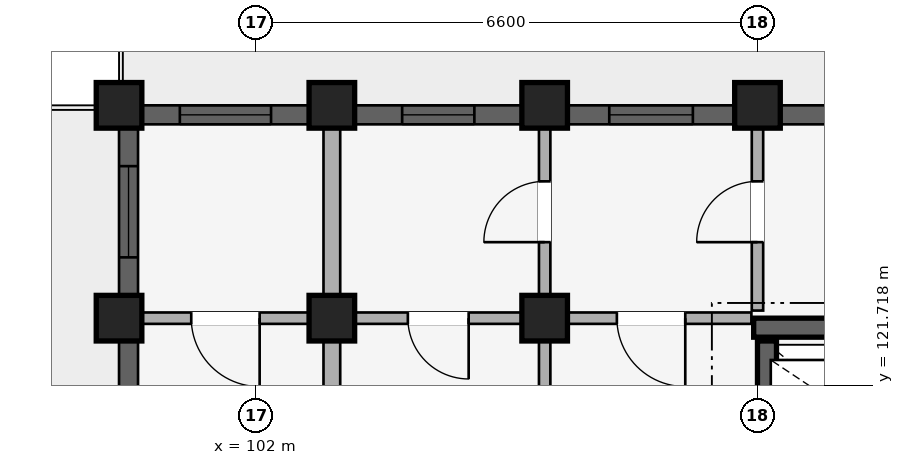
"""IFC4 building model, lengths in metres.
Left out: names, types, materials, properties, quantities, classifications, styles, units other than length and angle.
Written with IfcOpenShell. Run it as: python <this file> out.ifc"""

import sys

from ifc_helpers import new_model, si_unit, direction, frame, frame_2d, origin, origin_2d, place, context, subcontext, project, spatial, rectangle, extrude, element, fill, save


model = new_model("IFC4")
c1 = context("Model", 3, precision=1e-05, world=origin(), true_north=direction((0.0, 1.0)))
c2 = subcontext(c1, "Body", "Model", "MODEL_VIEW")
j1 = project(units=[si_unit("LENGTHUNIT", "METRE"), si_unit("PLANEANGLEUNIT", "RADIAN")], contexts=[c1])
p1 = place(None, origin())
s1 = spatial("IfcSite", under=j1, at=p1, CompositionType="ELEMENT")
p2 = place(p1, origin())
s2 = spatial("IfcBuilding", under=s1, at=p2, CompositionType="ELEMENT")
p3 = place(p2, frame((0.0, 0.0, 37.05)))
s3 = spatial("IfcBuildingStorey", under=s2, at=p3, CompositionType="ELEMENT", Elevation=37.05)
p4 = place(p3, frame((111.35, 122.475, 0.0), z_axis=(0.0, 0.0, 1.0), x_axis=(-1.0, 0.0, 0.0)))
e1 = element("IfcWall", 1, at=p4, inside=s3, PredefinedType="SHEAR", context=c2, shape_type="SweptSolid", body=[
    extrude(rectangle(XDim=2.8, YDim=0.25, at=frame_2d((1.4, 0.0))), origin(), (0.0, 0.0, 1.0), 2.93),
])
p5 = place(p3, frame((108.725, 120.15, 0.0), z_axis=(0.0, 0.0, 1.0), x_axis=(0.0, 1.0, 0.0)))
e2 = element("IfcWall", 2, at=p5, inside=s3, PredefinedType="SHEAR", context=c2, shape_type="SweptSolid", body=[
    extrude(rectangle(XDim=2.15, YDim=0.25, at=frame_2d((1.075, 0.0))), origin(), (0.0, 0.0, 1.0), 2.93),
])
p6 = place(p3, frame((108.6, 125.4, 0.0), z_axis=(0.0, 0.0, 1.0), x_axis=(1.0, 0.0, 0.0)))
e3 = element("IfcColumn", 3, at=p6, inside=s3, PredefinedType="COLUMN", context=c2, shape_type="SweptSolid", body=[
    extrude(rectangle(XDim=0.6, YDim=0.6, at=origin_2d()), origin(), (0.0, 0.0, 1.0), 2.97),
])
p7 = place(p3, frame((105.8, 122.6, 0.0), z_axis=(0.0, 0.0, 1.0), x_axis=(1.0, 0.0, 0.0)))
e4 = element("IfcColumn", 4, at=p7, inside=s3, PredefinedType="COLUMN", context=c2, shape_type="SweptSolid", body=[
    extrude(rectangle(XDim=0.6, YDim=0.6, at=origin_2d()), origin(), (0.0, 0.0, 1.0), 2.93),
])
p8 = place(p3, frame((105.8, 125.4, 0.0), z_axis=(0.0, 0.0, 1.0), x_axis=(1.0, 0.0, 0.0)))
e5 = element("IfcColumn", 5, at=p8, inside=s3, PredefinedType="COLUMN", context=c2, shape_type="SweptSolid", body=[
    extrude(rectangle(XDim=0.6, YDim=0.6, at=origin_2d()), origin(), (0.0, 0.0, 1.0), 2.97),
])
p9 = place(p3, frame((103.0, 122.6, 0.0), z_axis=(0.0, 0.0, 1.0), x_axis=(1.0, 0.0, 0.0)))
e6 = element("IfcColumn", 6, at=p9, inside=s3, PredefinedType="COLUMN", context=c2, shape_type="SweptSolid", body=[
    extrude(rectangle(XDim=0.6, YDim=0.6, at=origin_2d()), origin(), (0.0, 0.0, 1.0), 2.93),
])
p10 = place(p3, frame((103.0, 125.4, 0.0), z_axis=(0.0, 0.0, 1.0), x_axis=(1.0, 0.0, 0.0)))
e7 = element("IfcColumn", 7, at=p10, inside=s3, PredefinedType="COLUMN", context=c2, shape_type="SweptSolid", body=[
    extrude(rectangle(XDim=0.6, YDim=0.6, at=origin_2d()), origin(), (0.0, 0.0, 1.0), 2.97),
])
p11 = place(p3, frame((100.2, 122.6, 0.0), z_axis=(0.0, 0.0, 1.0), x_axis=(1.0, 0.0, 0.0)))
e8 = element("IfcColumn", 8, at=p11, inside=s3, PredefinedType="COLUMN", context=c2, shape_type="SweptSolid", body=[
    extrude(rectangle(XDim=0.6, YDim=0.6, at=origin_2d()), origin(), (0.0, 0.0, 1.0), 2.93),
])
p12 = place(p3, frame((100.2, 125.4, 0.0), z_axis=(0.0, 0.0, 1.0), x_axis=(1.0, 0.0, 0.0)))
e9 = element("IfcColumn", 9, at=p12, inside=s3, PredefinedType="COLUMN", context=c2, shape_type="SweptSolid", body=[
    extrude(rectangle(XDim=0.6, YDim=0.6, at=origin_2d()), origin(), (0.0, 0.0, 1.0), 2.97),
])
p13 = place(p3, frame((108.52, 122.6, 0.0), z_axis=(0.0, 0.0, 1.0), x_axis=(-1.0, 0.0, 0.0)))
e10 = element("IfcWall", 10, at=p13, inside=s3, PredefinedType="PLUMBINGWALL", context=c2, shape_type="SweptSolid", body=[
    extrude(rectangle(XDim=2.64, YDim=0.15, at=frame_2d((1.32, 0.0))), origin(), (0.0, 0.0, 1.0), 2.372),
])
p14 = place(p13, frame((0.87, 0.0, 0.0)))
e11 = element("IfcOpeningElement", 11, at=p14, cuts=e10, PredefinedType="OPENING", context=c2, shape_type="SweptSolid", body=[
    extrude(rectangle(XDim=0.9, YDim=2.1, at=frame_2d((0.45, 1.05))), frame((0.0, 0.085, 0.0), z_axis=(0.0, -1.0, 0.0), x_axis=(1.0, 0.0, 0.0)), (0.0, 0.0, 1.0), 0.17),
])
p15 = place(p3, frame((105.72, 122.6, 0.0), z_axis=(0.0, 0.0, 1.0), x_axis=(-1.0, 0.0, 0.0)))
e12 = element("IfcWall", 12, at=p15, inside=s3, PredefinedType="PLUMBINGWALL", context=c2, shape_type="SweptSolid", body=[
    extrude(rectangle(XDim=2.64, YDim=0.15, at=frame_2d((1.32, 0.0))), origin(), (0.0, 0.0, 1.0), 2.372),
])
p16 = place(p15, frame((0.92, 0.0, 0.0)))
e13 = element("IfcOpeningElement", 13, at=p16, cuts=e12, PredefinedType="OPENING", context=c2, shape_type="SweptSolid", body=[
    extrude(rectangle(XDim=0.8, YDim=2.1, at=frame_2d((0.4, 1.05))), frame((0.0, 0.085, 0.0), z_axis=(0.0, -1.0, 0.0), x_axis=(1.0, 0.0, 0.0)), (0.0, 0.0, 1.0), 0.17),
])
p17 = place(p3, frame((102.92, 122.6, 0.0), z_axis=(0.0, 0.0, 1.0), x_axis=(-1.0, 0.0, 0.0)))
e14 = element("IfcWall", 14, at=p17, inside=s3, PredefinedType="PLUMBINGWALL", context=c2, shape_type="SweptSolid", body=[
    extrude(rectangle(XDim=2.64, YDim=0.15, at=frame_2d((1.32, 0.0))), origin(), (0.0, 0.0, 1.0), 2.372),
])
p18 = place(p17, frame((0.87, 0.0, 0.0)))
e15 = element("IfcOpeningElement", 15, at=p18, cuts=e14, PredefinedType="OPENING", context=c2, shape_type="SweptSolid", body=[
    extrude(rectangle(XDim=0.9, YDim=2.1, at=frame_2d((0.45, 1.05))), frame((0.0, 0.085, 0.0), z_axis=(0.0, -1.0, 0.0), x_axis=(1.0, 0.0, 0.0)), (0.0, 0.0, 1.0), 0.17),
])
p19 = place(p3, frame((108.6, 122.7, 0.0), z_axis=(0.0, 0.0, 1.0), x_axis=(0.0, 1.0, 0.0)))
e16 = element("IfcWall", 16, at=p19, inside=s3, PredefinedType="PARTITIONING", context=c2, shape_type="SweptSolid", body=[
    extrude(rectangle(XDim=2.42, YDim=0.15, at=frame_2d((1.21, 0.0))), origin(), (0.0, 0.0, 1.0), 2.372),
])
p20 = place(p19, frame((0.9, 0.0, 0.0)))
e17 = element("IfcOpeningElement", 17, at=p20, cuts=e16, PredefinedType="OPENING", context=c2, shape_type="SweptSolid", body=[
    extrude(rectangle(XDim=0.8, YDim=2.1, at=frame_2d((0.4, 1.05))), frame((0.0, 0.085, 0.0), z_axis=(0.0, -1.0, 0.0), x_axis=(1.0, 0.0, 0.0)), (0.0, 0.0, 1.0), 0.17),
])
p21 = place(p3, frame((105.8, 116.05, 0.0), z_axis=(0.0, 0.0, 1.0), x_axis=(0.0, 1.0, 0.0)))
e18 = element("IfcWall", 18, at=p21, inside=s3, PredefinedType="PARTITIONING", context=c2, shape_type="SweptSolid", body=[
    extrude(rectangle(XDim=6.53, YDim=0.15, at=frame_2d((3.265, 0.0))), origin(), (0.0, 0.0, 1.0), 2.372),
])
p22 = place(p21, frame((2.815, 0.0, 0.0)))
e19 = element("IfcOpeningElement", 19, at=p22, cuts=e18, PredefinedType="OPENING", context=c2, shape_type="SweptSolid", body=[
    extrude(rectangle(XDim=0.9, YDim=2.1, at=frame_2d((0.45, 1.05))), frame((0.0, 0.085, 0.0), z_axis=(0.0, -1.0, 0.0), x_axis=(1.0, 0.0, 0.0)), (0.0, 0.0, 1.0), 0.17),
])
p23 = place(p3, frame((105.8, 122.7, 0.0), z_axis=(0.0, 0.0, 1.0), x_axis=(0.0, 1.0, 0.0)))
e20 = element("IfcWall", 20, at=p23, inside=s3, PredefinedType="PARTITIONING", context=c2, shape_type="SweptSolid", body=[
    extrude(rectangle(XDim=2.42, YDim=0.15, at=frame_2d((1.21, 0.0))), origin(), (0.0, 0.0, 1.0), 2.372),
])
p24 = place(p23, frame((0.9, 0.0, 0.0)))
e21 = element("IfcOpeningElement", 21, at=p24, cuts=e20, PredefinedType="OPENING", context=c2, shape_type="SweptSolid", body=[
    extrude(rectangle(XDim=0.8, YDim=2.1, at=frame_2d((0.4, 1.05))), frame((0.0, 0.085, 0.0), z_axis=(0.0, -1.0, 0.0), x_axis=(1.0, 0.0, 0.0)), (0.0, 0.0, 1.0), 0.17),
])
p25 = place(p3, frame((103.0, 116.05, 0.0), z_axis=(0.0, 0.0, 1.0), x_axis=(0.0, 1.0, 0.0)))
e22 = element("IfcWall", 22, at=p25, inside=s3, PredefinedType="STANDARD", context=c2, shape_type="SweptSolid", body=[
    extrude(rectangle(XDim=6.53, YDim=0.22, at=frame_2d((3.265, 0.0))), origin(), (0.0, 0.0, 1.0), 2.372),
])
p26 = place(p3, frame((103.0, 122.7, 0.0), z_axis=(0.0, 0.0, 1.0), x_axis=(0.0, 1.0, 0.0)))
e23 = element("IfcWall", 23, at=p26, inside=s3, PredefinedType="STANDARD", context=c2, shape_type="SweptSolid", body=[
    extrude(rectangle(XDim=2.42, YDim=0.22, at=frame_2d((1.21, 0.0))), origin(), (0.0, 0.0, 1.0), 2.372),
])
p27 = place(p3, frame((113.896, 125.275, 0.0), z_axis=(0.0, 0.0, 1.0), x_axis=(-1.0, 0.0, 0.0)))
e24 = element("IfcWall", 24, at=p27, inside=s3, PredefinedType="STANDARD", context=c2, shape_type="SweptSolid", body=[
    extrude(rectangle(XDim=4.993, YDim=0.25, at=frame_2d((2.497, 0.0))), origin(), (0.0, 0.0, 1.0), 2.48),
])
p28 = place(p27, frame((1.896, 0.0, 0.78)))
e25 = element("IfcOpeningElement", 25, at=p28, cuts=e24, PredefinedType="OPENING", context=c2, shape_type="SweptSolid", body=[
    extrude(rectangle(XDim=1.2, YDim=1.5, at=frame_2d((0.6, 0.75))), frame((0.0, 0.135, 0.0), z_axis=(0.0, -1.0, 0.0), x_axis=(1.0, 0.0, 0.0)), (0.0, 0.0, 1.0), 0.27),
])
p29 = place(p3, frame((108.296, 125.275, 0.0), z_axis=(0.0, 0.0, 1.0), x_axis=(-1.0, 0.0, 0.0)))
e26 = element("IfcWall", 26, at=p29, inside=s3, PredefinedType="STANDARD", context=c2, shape_type="SweptSolid", body=[
    extrude(rectangle(XDim=2.193, YDim=0.25, at=frame_2d((1.096, 0.0))), origin(), (0.0, 0.0, 1.0), 2.48),
])
p30 = place(p29, frame((0.546, 0.0, 0.83)))
e27 = element("IfcOpeningElement", 27, at=p30, cuts=e26, PredefinedType="OPENING", context=c2, shape_type="SweptSolid", body=[
    extrude(rectangle(XDim=1.1, YDim=1.45, at=frame_2d((0.55, 0.725))), frame((0.0, 0.135, 0.0), z_axis=(0.0, -1.0, 0.0), x_axis=(1.0, 0.0, 0.0)), (0.0, 0.0, 1.0), 0.27),
])
p31 = place(p3, frame((105.497, 125.275, 0.0), z_axis=(0.0, 0.0, 1.0), x_axis=(-1.0, 0.0, 0.0)))
e28 = element("IfcWall", 28, at=p31, inside=s3, PredefinedType="STANDARD", context=c2, shape_type="SweptSolid", body=[
    extrude(rectangle(XDim=2.193, YDim=0.25, at=frame_2d((1.097, 0.0))), origin(), (0.0, 0.0, 1.0), 2.48),
])
p32 = place(p31, frame((0.622, 0.0, 0.88)))
e29 = element("IfcOpeningElement", 29, at=p32, cuts=e28, PredefinedType="OPENING", context=c2, shape_type="SweptSolid", body=[
    extrude(rectangle(XDim=0.95, YDim=1.35, at=frame_2d((0.475, 0.675))), frame((0.0, 0.135, 0.0), z_axis=(0.0, -1.0, 0.0), x_axis=(1.0, 0.0, 0.0)), (0.0, 0.0, 1.0), 0.27),
])
p33 = place(p3, frame((102.697, 125.275, 0.0), z_axis=(0.0, 0.0, 1.0), x_axis=(-1.0, 0.0, 0.0)))
e30 = element("IfcWall", 30, at=p33, inside=s3, PredefinedType="STANDARD", context=c2, shape_type="SweptSolid", body=[
    extrude(rectangle(XDim=2.193, YDim=0.25, at=frame_2d((1.097, 0.0))), origin(), (0.0, 0.0, 1.0), 2.48),
])
p34 = place(p33, frame((0.497, 0.0, 0.78)))
e31 = element("IfcOpeningElement", 31, at=p34, cuts=e30, PredefinedType="OPENING", context=c2, shape_type="SweptSolid", body=[
    extrude(rectangle(XDim=1.2, YDim=1.5, at=frame_2d((0.6, 0.75))), frame((0.0, 0.135, 0.0), z_axis=(0.0, -1.0, 0.0), x_axis=(1.0, 0.0, 0.0)), (0.0, 0.0, 1.0), 0.27),
])
p35 = place(p3, frame((100.325, 116.329, 0.0), z_axis=(0.0, 0.0, 1.0), x_axis=(0.0, 1.0, 0.0)))
e32 = element("IfcWall", 32, at=p35, inside=s3, PredefinedType="STANDARD", context=c2, shape_type="SweptSolid", body=[
    extrude(rectangle(XDim=5.968, YDim=0.25, at=frame_2d((2.984, 0.0))), origin(), (0.0, 0.0, 1.0), 2.372),
])
p36 = place(p35, frame((3.754, 0.0, 0.522)))
e33 = element("IfcOpeningElement", 33, at=p36, cuts=e32, PredefinedType="OPENING", context=c2, shape_type="SweptSolid", body=[
    extrude(rectangle(XDim=1.2, YDim=1.5, at=frame_2d((0.6, 0.75))), frame((0.0, 0.135, 0.0), z_axis=(0.0, -1.0, 0.0), x_axis=(1.0, 0.0, 0.0)), (0.0, 0.0, 1.0), 0.27),
])
p37 = place(p35, frame((1.489, 0.0, 0.0)))
e34 = element("IfcOpeningElement", 34, at=p37, cuts=e32, PredefinedType="OPENING", context=c2, shape_type="SweptSolid", body=[
    extrude(rectangle(XDim=1.2, YDim=2.15, at=frame_2d((0.6, 1.075))), frame((0.0, 0.135, 0.0), z_axis=(0.0, -1.0, 0.0), x_axis=(1.0, 0.0, 0.0)), (0.0, 0.0, 1.0), 0.27),
])
p38 = place(p3, frame((100.325, 122.904, 0.0), z_axis=(0.0, 0.0, 1.0), x_axis=(0.0, 1.0, 0.0)))
e35 = element("IfcWall", 35, at=p38, inside=s3, PredefinedType="STANDARD", context=c2, shape_type="SweptSolid", body=[
    extrude(rectangle(XDim=2.193, YDim=0.25, at=frame_2d((1.096, 0.0))), origin(), (0.0, 0.0, 1.0), 2.412),
])
p39 = place(p38, frame((0.497, 0.0, 0.712)))
e36 = element("IfcOpeningElement", 36, at=p39, cuts=e35, PredefinedType="OPENING", context=c2, shape_type="SweptSolid", body=[
    extrude(rectangle(XDim=1.2, YDim=1.5, at=frame_2d((0.6, 0.75))), frame((0.0, 0.135, 0.0), z_axis=(0.0, -1.0, 0.0), x_axis=(1.0, 0.0, 0.0)), (0.0, 0.0, 1.0), 0.27),
])
p40 = place(p30, origin())
e37 = element("IfcWindow", 37, at=p40, inside=s3, PartitioningType="SINGLE_PANEL", PredefinedType="WINDOW", context=c2, shape_type="SweptSolid", body=[
    extrude(rectangle(XDim=1.1, YDim=1.45, at=frame_2d((0.55, 0.725))), frame((0.0, 0.03, 0.0), z_axis=(0.0, -1.0, 0.0), x_axis=(1.0, 0.0, 0.0)), (0.0, 0.0, 1.0), 0.06),
])
fill(e27, e37)
p41 = place(p32, origin())
e38 = element("IfcWindow", 38, at=p41, inside=s3, PartitioningType="SINGLE_PANEL", PredefinedType="WINDOW", context=c2, shape_type="SweptSolid", body=[
    extrude(rectangle(XDim=0.95, YDim=1.35, at=frame_2d((0.475, 0.675))), frame((0.0, 0.03, 0.0), z_axis=(0.0, -1.0, 0.0), x_axis=(1.0, 0.0, 0.0)), (0.0, 0.0, 1.0), 0.06),
])
fill(e29, e38)
p42 = place(p34, origin())
e39 = element("IfcWindow", 39, at=p42, inside=s3, PartitioningType="SINGLE_PANEL", PredefinedType="WINDOW", context=c2, shape_type="SweptSolid", body=[
    extrude(rectangle(XDim=1.2, YDim=1.5, at=frame_2d((0.6, 0.75))), frame((0.0, 0.03, 0.0), z_axis=(0.0, -1.0, 0.0), x_axis=(1.0, 0.0, 0.0)), (0.0, 0.0, 1.0), 0.06),
])
fill(e31, e39)
p43 = place(p39, origin())
e40 = element("IfcWindow", 40, at=p43, inside=s3, PartitioningType="SINGLE_PANEL", PredefinedType="WINDOW", context=c2, shape_type="SweptSolid", body=[
    extrude(rectangle(XDim=1.2, YDim=1.5, at=frame_2d((0.6, 0.75))), frame((0.0, 0.03, 0.0), z_axis=(0.0, -1.0, 0.0), x_axis=(1.0, 0.0, 0.0)), (0.0, 0.0, 1.0), 0.06),
])
fill(e36, e40)
p44 = place(p14, frame((0.9, 0.0, 0.0), z_axis=(0.0, 0.0, 1.0), x_axis=(-1.0, 0.0, 0.0)))
e41 = element("IfcDoor", 41, at=p44, inside=s3, OperationType="SINGLE_SWING_RIGHT", PredefinedType="DOOR", context=c2, shape_type="SweptSolid", body=[
    extrude(rectangle(XDim=0.9, YDim=2.1, at=frame_2d((0.45, 1.05))), frame((0.0, 0.025, 0.0), z_axis=(0.0, -1.0, 0.0), x_axis=(1.0, 0.0, 0.0)), (0.0, 0.0, 1.0), 0.05),
])
fill(e11, e41)
p45 = place(p16, frame((0.8, 0.0, 0.0), z_axis=(0.0, 0.0, 1.0), x_axis=(-1.0, 0.0, 0.0)))
e42 = element("IfcDoor", 42, at=p45, inside=s3, OperationType="SINGLE_SWING_RIGHT", PredefinedType="DOOR", context=c2, shape_type="SweptSolid", body=[
    extrude(rectangle(XDim=0.8, YDim=2.1, at=frame_2d((0.4, 1.05))), frame((0.0, 0.025, 0.0), z_axis=(0.0, -1.0, 0.0), x_axis=(1.0, 0.0, 0.0)), (0.0, 0.0, 1.0), 0.05),
])
fill(e13, e42)
p46 = place(p18, frame((0.9, 0.0, 0.0), z_axis=(0.0, 0.0, 1.0), x_axis=(-1.0, 0.0, 0.0)))
e43 = element("IfcDoor", 43, at=p46, inside=s3, OperationType="SINGLE_SWING_RIGHT", PredefinedType="DOOR", context=c2, shape_type="SweptSolid", body=[
    extrude(rectangle(XDim=0.9, YDim=2.1, at=frame_2d((0.45, 1.05))), frame((0.0, 0.025, 0.0), z_axis=(0.0, -1.0, 0.0), x_axis=(1.0, 0.0, 0.0)), (0.0, 0.0, 1.0), 0.05),
])
fill(e15, e43)
p47 = place(p20, frame((0.8, 0.0, 0.0), z_axis=(0.0, 0.0, 1.0), x_axis=(-1.0, 0.0, 0.0)))
e44 = element("IfcDoor", 44, at=p47, inside=s3, OperationType="SINGLE_SWING_RIGHT", PredefinedType="DOOR", context=c2, shape_type="SweptSolid", body=[
    extrude(rectangle(XDim=0.8, YDim=2.1, at=frame_2d((0.4, 1.05))), frame((0.0, 0.025, 0.0), z_axis=(0.0, -1.0, 0.0), x_axis=(1.0, 0.0, 0.0)), (0.0, 0.0, 1.0), 0.05),
])
fill(e17, e44)
p48 = place(p24, origin())
e45 = element("IfcDoor", 45, at=p48, inside=s3, OperationType="SINGLE_SWING_LEFT", PredefinedType="DOOR", context=c2, shape_type="SweptSolid", body=[
    extrude(rectangle(XDim=0.8, YDim=2.1, at=frame_2d((0.4, 1.05))), frame((0.0, 0.025, 0.0), z_axis=(0.0, -1.0, 0.0), x_axis=(1.0, 0.0, 0.0)), (0.0, 0.0, 1.0), 0.05),
])
fill(e21, e45)
save(model, sys.argv[1])
